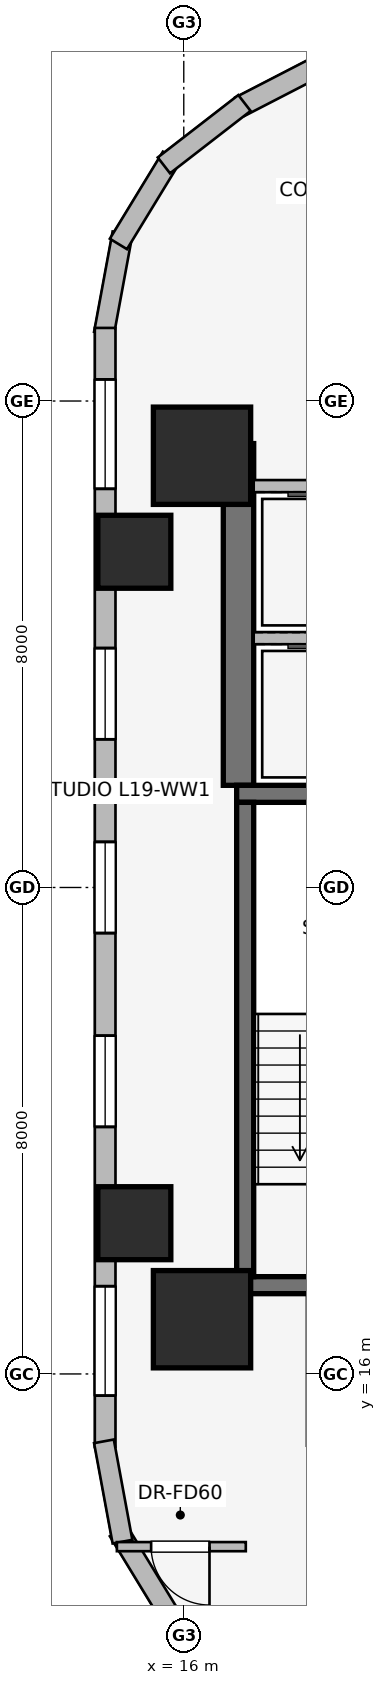
"""IFC4 building model, lengths in metres.
Left out: names, types, materials, properties, quantities, classifications, styles, units other than length and angle.
Written with IfcOpenShell. Run it as: python <this file> out.ifc"""

import sys

from ifc_helpers import new_model, si_unit, direction, frame, frame_2d, origin, origin_2d, place, context, subcontext, project, spatial, rectangle, extrude, element, fill, save


model = new_model("IFC4")
c1 = context("Model", 3, precision=1e-05, world=origin(), true_north=direction((0.0, 1.0)))
c2 = subcontext(c1, "Body", "Model", "MODEL_VIEW")
j1 = project(units=[si_unit("LENGTHUNIT", "METRE"), si_unit("PLANEANGLEUNIT", "RADIAN")], contexts=[c1])
p1 = place(None, origin())
s1 = spatial("IfcSite", under=j1, at=p1, CompositionType="ELEMENT")
p2 = place(p1, origin())
s2 = spatial("IfcBuilding", under=s1, at=p2, CompositionType="ELEMENT")
p3 = place(p2, frame((0.0, 0.0, 74.45)))
s3 = spatial("IfcBuildingStorey", under=s2, at=p3, CompositionType="ELEMENT", Elevation=74.45)
p4 = place(p3, frame((16.9, 25.68, 0.0), z_axis=(0.0, 0.0, 1.0), x_axis=(0.0, 1.0, 0.0)))
e1 = element("IfcWall", 1, at=p4, inside=s3, PredefinedType="SHEAR", context=c2, shape_type="SweptSolid", body=[
    extrude(rectangle(XDim=5.62, YDim=0.5, at=frame_2d((2.81, 0.0))), origin(), (0.0, 0.0, 1.0), 3.65),
])
for number, where, z_axis, x_axis in (
    (2, (16.87, 17.46, 0.0), (0.0, 0.0, 1.0), (1.0, 0.0, 0.0)),
    (3, (20.63, 25.54, 0.0), (0.0, 0.0, 1.0), (-1.0, 0.0, 0.0)),
):
    element("IfcWall", number, at=place(p3, frame(where, z_axis=z_axis, x_axis=x_axis)), inside=s3, PredefinedType="SHEAR", context=c2, shape_type="SweptSolid", body=[
        extrude(rectangle(XDim=3.76, YDim=0.28, at=frame_2d((1.88, 0.0))), origin(), (0.0, 0.0, 1.0), 3.65),
    ])
p5 = place(p3, frame((17.01, 25.4, 0.0), z_axis=(0.0, 0.0, 1.0), x_axis=(0.0, -1.0, 0.0)))
e4 = element("IfcWall", 4, at=p5, inside=s3, PredefinedType="SHEAR", context=c2, shape_type="SweptSolid", body=[
    extrude(rectangle(XDim=7.8, YDim=0.28, at=frame_2d((3.9, 0.0))), origin(), (0.0, 0.0, 1.0), 3.65),
])
for number, where, z_axis, x_axis in (
    (5, (16.3, 16.9, 0.0), (0.0, 0.0, 1.0), (1.0, 0.0, 0.0)),
    (6, (16.3, 31.1, 0.0), (0.0, 0.0, 1.0), (1.0, 0.0, 0.0)),
):
    element("IfcColumn", number, at=place(p3, frame(where, z_axis=z_axis, x_axis=x_axis)), inside=s3, PredefinedType="COLUMN", context=c2, shape_type="SweptSolid", body=[
        extrude(rectangle(XDim=1.6, YDim=1.6, at=origin_2d()), origin(), (0.0, 0.0, 1.0), 3.65),
    ])
for number, where, z_axis, x_axis in (
    (7, (15.187, 29.521, 0.0), (0.0, 0.0, 1.0), (1.0, 0.0, 0.0)),
    (8, (15.187, 18.479, 0.0), (0.0, 0.0, 1.0), (1.0, 0.0, 0.0)),
):
    element("IfcColumn", number, at=place(p3, frame(where, z_axis=z_axis, x_axis=x_axis)), inside=s3, PredefinedType="COLUMN", context=c2, shape_type="SweptSolid", body=[
        extrude(rectangle(XDim=1.2, YDim=1.2, at=origin_2d()), origin(), (0.0, 0.0, 1.0), 3.65),
    ])
p6 = place(p3, frame((16.924, 36.841, 0.0), z_axis=(0.0, 0.0, 1.0), x_axis=(0.888634413993, 0.458616264721, 0.0)))
e9 = element("IfcWall", 9, at=p6, inside=s3, PredefinedType="STANDARD", context=c2, shape_type="SweptSolid", body=[
    extrude(rectangle(XDim=20.531, YDim=0.34, at=frame_2d((10.266, 0.0))), origin(), (0.0, 0.0, 1.0), 2.684),
])
p7 = place(p6, frame((5.283, 0.0, 0.75)))
e10 = element("IfcOpeningElement", 10, at=p7, cuts=e9, PredefinedType="OPENING", context=c2, shape_type="SweptSolid", body=[
    extrude(rectangle(XDim=1.8, YDim=1.5, at=frame_2d((0.9, 0.75))), frame((0.0, 0.18, 0.0), z_axis=(0.0, -1.0, 0.0), x_axis=(1.0, 0.0, 0.0)), (0.0, 0.0, 1.0), 0.36),
])
p8 = place(p6, frame((7.956, 0.0, 0.75)))
e11 = element("IfcOpeningElement", 11, at=p8, cuts=e9, PredefinedType="OPENING", context=c2, shape_type="SweptSolid", body=[
    extrude(rectangle(XDim=1.8, YDim=1.5, at=frame_2d((0.9, 0.75))), frame((0.0, 0.18, 0.0), z_axis=(0.0, -1.0, 0.0), x_axis=(1.0, 0.0, 0.0)), (0.0, 0.0, 1.0), 0.36),
])
p9 = place(p6, frame((11.359, 0.0, 0.75)))
e12 = element("IfcOpeningElement", 12, at=p9, cuts=e9, PredefinedType="OPENING", context=c2, shape_type="SweptSolid", body=[
    extrude(rectangle(XDim=1.5, YDim=1.5, at=frame_2d((0.75, 0.75))), frame((0.0, 0.18, 0.0), z_axis=(0.0, -1.0, 0.0), x_axis=(1.0, 0.0, 0.0)), (0.0, 0.0, 1.0), 0.36),
])
p10 = place(p6, frame((13.743, 0.0, 0.75)))
e13 = element("IfcOpeningElement", 13, at=p10, cuts=e9, PredefinedType="OPENING", context=c2, shape_type="SweptSolid", body=[
    extrude(rectangle(XDim=1.5, YDim=1.5, at=frame_2d((0.75, 0.75))), frame((0.0, 0.18, 0.0), z_axis=(0.0, -1.0, 0.0), x_axis=(1.0, 0.0, 0.0)), (0.0, 0.0, 1.0), 0.36),
])
p11 = place(p6, frame((17.476, 0.0, 0.75)))
e14 = element("IfcOpeningElement", 14, at=p11, cuts=e9, PredefinedType="OPENING", context=c2, shape_type="SweptSolid", body=[
    extrude(rectangle(XDim=1.05, YDim=1.4, at=frame_2d((0.525, 0.7))), frame((0.0, 0.18, 0.0), z_axis=(0.0, -1.0, 0.0), x_axis=(1.0, 0.0, 0.0)), (0.0, 0.0, 1.0), 0.36),
])
p12 = place(p3, frame((14.687, 33.108, 0.0), z_axis=(0.0, 0.0, 1.0), x_axis=(0.181714143354, 0.983351397063, 0.0)))
e15 = element("IfcWall", 15, at=p12, inside=s3, PredefinedType="STANDARD", context=c2, shape_type="SweptSolid", body=[
    extrude(rectangle(XDim=1.678, YDim=0.33, at=frame_2d((0.839, 0.0))), origin(), (0.0, 0.0, 1.0), 3.39),
])
p13 = place(p3, frame((14.925, 34.583, 0.0), z_axis=(0.0, 0.0, 1.0), x_axis=(0.520584129191, 0.853810379671, 0.0)))
e16 = element("IfcWall", 16, at=p13, inside=s3, PredefinedType="STANDARD", context=c2, shape_type="SweptSolid", body=[
    extrude(rectangle(XDim=1.677, YDim=0.33, at=frame_2d((0.838, 0.0))), origin(), (0.0, 0.0, 1.0), 3.39),
])
p14 = place(p3, frame((15.673, 35.875, 0.0), z_axis=(0.0, 0.0, 1.0), x_axis=(0.790691856293, 0.61221433207, 0.0)))
e17 = element("IfcWall", 17, at=p14, inside=s3, PredefinedType="STANDARD", context=c2, shape_type="SweptSolid", body=[
    extrude(rectangle(XDim=1.676, YDim=0.33, at=frame_2d((0.838, 0.0))), origin(), (0.0, 0.0, 1.0), 3.39),
])
p15 = place(p3, frame((14.707, 14.798, 0.0), z_axis=(0.0, 0.0, 1.0), x_axis=(0.0, 1.0, 0.0)))
e18 = element("IfcWall", 18, at=p15, inside=s3, PredefinedType="STANDARD", context=c2, shape_type="SweptSolid", body=[
    extrude(rectangle(XDim=18.404, YDim=0.34, at=frame_2d((9.202, 0.0))), origin(), (0.0, 0.0, 1.0), 2.684),
])
p16 = place(p15, frame((0.845, 0.0, 0.75)))
e19 = element("IfcOpeningElement", 19, at=p16, cuts=e18, PredefinedType="OPENING", context=c2, shape_type="SweptSolid", body=[
    extrude(rectangle(XDim=1.8, YDim=1.5, at=frame_2d((0.9, 0.75))), frame((0.0, 0.18, 0.0), z_axis=(0.0, -1.0, 0.0), x_axis=(1.0, 0.0, 0.0)), (0.0, 0.0, 1.0), 0.36),
])
p17 = place(p15, frame((5.265, 0.0, 0.75)))
e20 = element("IfcOpeningElement", 20, at=p17, cuts=e18, PredefinedType="OPENING", context=c2, shape_type="SweptSolid", body=[
    extrude(rectangle(XDim=1.5, YDim=1.5, at=frame_2d((0.75, 0.75))), frame((0.0, 0.18, 0.0), z_axis=(0.0, -1.0, 0.0), x_axis=(1.0, 0.0, 0.0)), (0.0, 0.0, 1.0), 0.36),
])
p18 = place(p15, frame((8.452, 0.0, 0.75)))
e21 = element("IfcOpeningElement", 21, at=p18, cuts=e18, PredefinedType="OPENING", context=c2, shape_type="SweptSolid", body=[
    extrude(rectangle(XDim=1.5, YDim=1.5, at=frame_2d((0.75, 0.75))), frame((0.0, 0.18, 0.0), z_axis=(0.0, -1.0, 0.0), x_axis=(1.0, 0.0, 0.0)), (0.0, 0.0, 1.0), 0.36),
])
p19 = place(p15, frame((11.639, 0.0, 0.75)))
e22 = element("IfcOpeningElement", 22, at=p19, cuts=e18, PredefinedType="OPENING", context=c2, shape_type="SweptSolid", body=[
    extrude(rectangle(XDim=1.5, YDim=1.5, at=frame_2d((0.75, 0.75))), frame((0.0, 0.18, 0.0), z_axis=(0.0, -1.0, 0.0), x_axis=(1.0, 0.0, 0.0)), (0.0, 0.0, 1.0), 0.36),
])
p20 = place(p15, frame((15.758, 0.0, 0.75)))
e23 = element("IfcOpeningElement", 23, at=p20, cuts=e18, PredefinedType="OPENING", context=c2, shape_type="SweptSolid", body=[
    extrude(rectangle(XDim=1.8, YDim=1.5, at=frame_2d((0.9, 0.75))), frame((0.0, 0.18, 0.0), z_axis=(0.0, -1.0, 0.0), x_axis=(1.0, 0.0, 0.0)), (0.0, 0.0, 1.0), 0.36),
])
p21 = place(p3, frame((16.998, 11.099, 0.0), z_axis=(0.0, 0.0, 1.0), x_axis=(-0.790691856293, 0.61221433207, 0.0)))
e24 = element("IfcWall", 24, at=p21, inside=s3, PredefinedType="STANDARD", context=c2, shape_type="SweptSolid", body=[
    extrude(rectangle(XDim=1.676, YDim=0.33, at=frame_2d((0.838, 0.0))), origin(), (0.0, 0.0, 1.0), 3.39),
])
p22 = place(p3, frame((15.798, 11.985, 0.0), z_axis=(0.0, 0.0, 1.0), x_axis=(-0.520584129191, 0.853810379671, 0.0)))
e25 = element("IfcWall", 25, at=p22, inside=s3, PredefinedType="STANDARD", context=c2, shape_type="SweptSolid", body=[
    extrude(rectangle(XDim=1.677, YDim=0.33, at=frame_2d((0.838, 0.0))), origin(), (0.0, 0.0, 1.0), 3.39),
])
p23 = place(p3, frame((14.992, 13.242, 0.0), z_axis=(0.0, 0.0, 1.0), x_axis=(-0.181714143354, 0.983351397063, 0.0)))
e26 = element("IfcWall", 26, at=p23, inside=s3, PredefinedType="STANDARD", context=c2, shape_type="SweptSolid", body=[
    extrude(rectangle(XDim=1.678, YDim=0.33, at=frame_2d((0.839, 0.0))), origin(), (0.0, 0.0, 1.0), 3.39),
])
p24 = place(p3, frame((17.15, 28.1, 0.0), z_axis=(0.0, 0.0, 1.0), x_axis=(1.0, 0.0, 0.0)))
e27 = element("IfcWall", 27, at=p24, inside=s3, PredefinedType="PARTITIONING", context=c2, shape_type="SweptSolid", body=[
    extrude(rectangle(XDim=2.5, YDim=0.2, at=frame_2d((1.25, 0.0))), origin(), (0.0, 0.0, 1.0), 3.39),
])
p25 = place(p3, frame((19.65, 30.6, 0.0), z_axis=(0.0, 0.0, 1.0), x_axis=(-1.0, 0.0, 0.0)))
e28 = element("IfcWall", 28, at=p25, inside=s3, PredefinedType="PARTITIONING", context=c2, shape_type="SweptSolid", body=[
    extrude(rectangle(XDim=2.5, YDim=0.2, at=frame_2d((1.25, 0.0))), origin(), (0.0, 0.0, 1.0), 2.29),
])
p26 = place(p3, frame((17.02, 13.16, 0.0), z_axis=(0.0, 0.0, 1.0), x_axis=(-1.0, 0.0, 0.0)))
e29 = element("IfcWall", 29, at=p26, inside=s3, PredefinedType="PARTITIONING", context=c2, shape_type="SweptSolid", body=[
    extrude(rectangle(XDim=2.12, YDim=0.15, at=frame_2d((1.06, 0.0))), origin(), (0.0, 0.0, 1.0), 3.39),
])
p27 = place(p26, frame((0.597, 0.0, 0.0)))
e30 = element("IfcOpeningElement", 30, at=p27, cuts=e29, PredefinedType="OPENING", context=c2, shape_type="SweptSolid", body=[
    extrude(rectangle(XDim=0.96, YDim=2.0, at=frame_2d((0.48, 1.0))), frame((0.0, 0.085, 0.0), z_axis=(0.0, -1.0, 0.0), x_axis=(1.0, 0.0, 0.0)), (0.0, 0.0, 1.0), 0.17),
])
p28 = place(p16, origin())
e31 = element("IfcWindow", 31, at=p28, inside=s3, PartitioningType="SINGLE_PANEL", PredefinedType="WINDOW", context=c2, shape_type="SweptSolid", body=[
    extrude(rectangle(XDim=1.8, YDim=1.5, at=frame_2d((0.9, 0.75))), frame((0.0, 0.03, 0.0), z_axis=(0.0, -1.0, 0.0), x_axis=(1.0, 0.0, 0.0)), (0.0, 0.0, 1.0), 0.06),
])
fill(e19, e31)
p29 = place(p17, origin())
e32 = element("IfcWindow", 32, at=p29, inside=s3, PartitioningType="SINGLE_PANEL", PredefinedType="WINDOW", context=c2, shape_type="SweptSolid", body=[
    extrude(rectangle(XDim=1.5, YDim=1.5, at=frame_2d((0.75, 0.75))), frame((0.0, 0.03, 0.0), z_axis=(0.0, -1.0, 0.0), x_axis=(1.0, 0.0, 0.0)), (0.0, 0.0, 1.0), 0.06),
])
fill(e20, e32)
p30 = place(p18, origin())
e33 = element("IfcWindow", 33, at=p30, inside=s3, PartitioningType="SINGLE_PANEL", PredefinedType="WINDOW", context=c2, shape_type="SweptSolid", body=[
    extrude(rectangle(XDim=1.5, YDim=1.5, at=frame_2d((0.75, 0.75))), frame((0.0, 0.03, 0.0), z_axis=(0.0, -1.0, 0.0), x_axis=(1.0, 0.0, 0.0)), (0.0, 0.0, 1.0), 0.06),
])
fill(e21, e33)
p31 = place(p19, origin())
e34 = element("IfcWindow", 34, at=p31, inside=s3, PartitioningType="SINGLE_PANEL", PredefinedType="WINDOW", context=c2, shape_type="SweptSolid", body=[
    extrude(rectangle(XDim=1.5, YDim=1.5, at=frame_2d((0.75, 0.75))), frame((0.0, 0.03, 0.0), z_axis=(0.0, -1.0, 0.0), x_axis=(1.0, 0.0, 0.0)), (0.0, 0.0, 1.0), 0.06),
])
fill(e22, e34)
p32 = place(p20, origin())
e35 = element("IfcWindow", 35, at=p32, inside=s3, PartitioningType="SINGLE_PANEL", PredefinedType="WINDOW", context=c2, shape_type="SweptSolid", body=[
    extrude(rectangle(XDim=1.8, YDim=1.5, at=frame_2d((0.9, 0.75))), frame((0.0, 0.03, 0.0), z_axis=(0.0, -1.0, 0.0), x_axis=(1.0, 0.0, 0.0)), (0.0, 0.0, 1.0), 0.06),
])
fill(e23, e35)
p33 = place(p27, origin())
e36 = element("IfcDoor", 36, at=p33, inside=s3, OperationType="SINGLE_SWING_LEFT", PredefinedType="DOOR", context=c2, shape_type="SweptSolid", body=[
    extrude(rectangle(XDim=0.96, YDim=2.0, at=frame_2d((0.48, 1.0))), frame((0.0, 0.025, 0.0), z_axis=(0.0, -1.0, 0.0), x_axis=(1.0, 0.0, 0.0)), (0.0, 0.0, 1.0), 0.05),
])
fill(e30, e36)
save(model, sys.argv[1])
